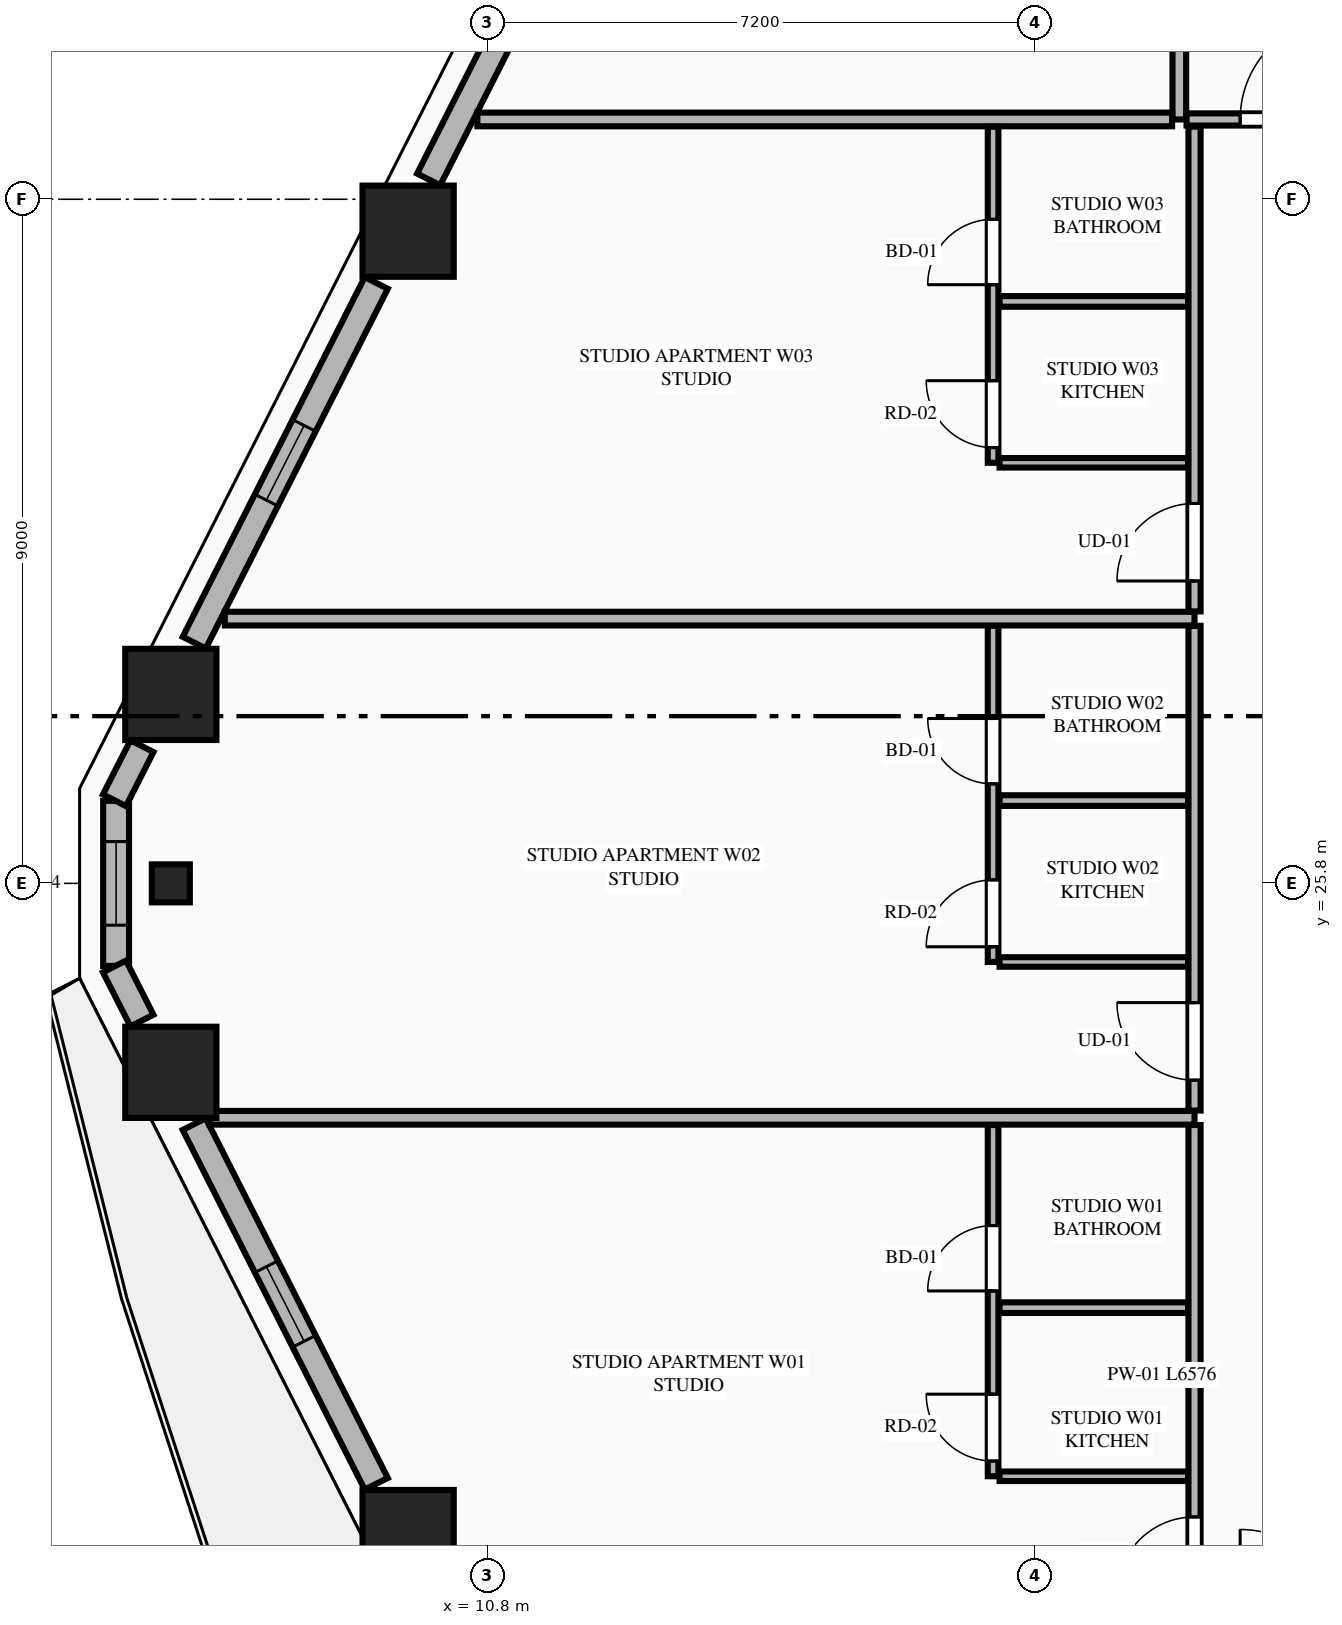
"""IFC4 building model, lengths in metres.
Left out: names, types, materials, properties, quantities, classifications, styles, units other than length and angle.
Written with IfcOpenShell. Run it as: python <this file> out.ifc"""

import sys

from ifc_helpers import new_model, si_unit, direction, frame, frame_2d, origin, origin_2d, place, context, subcontext, project, spatial, rectangle, extrude, element, fill, save


model = new_model("IFC4")
c1 = context("Model", 3, precision=1e-05, world=origin(), true_north=direction((0.0, 1.0)))
c2 = subcontext(c1, "Body", "Model", "MODEL_VIEW")
j1 = project(units=[si_unit("LENGTHUNIT", "METRE"), si_unit("PLANEANGLEUNIT", "RADIAN")], contexts=[c1])
p1 = place(None, origin())
s1 = spatial("IfcSite", under=j1, at=p1, CompositionType="ELEMENT")
p2 = place(p1, origin())
s2 = spatial("IfcBuilding", under=s1, at=p2, CompositionType="ELEMENT")
p3 = place(p2, frame((0.0, 0.0, 67.5)))
s3 = spatial("IfcBuildingStorey", under=s2, at=p3, CompositionType="ELEMENT", Elevation=67.5)
for number, where, z_axis, x_axis in (
    (1, (9.754, 34.38, 0.0), (0.0, 0.0, 1.0), (1.0, 0.0, 0.0)),
    (2, (6.632, 28.286, 0.0), (0.0, 0.0, 1.0), (1.0, 0.0, 0.0)),
    (3, (6.632, 23.314, 0.0), (0.0, 0.0, 1.0), (1.0, 0.0, 0.0)),
    (4, (9.754, 17.22, 0.0), (0.0, 0.0, 1.0), (1.0, 0.0, 0.0)),
):
    element("IfcColumn", number, at=place(p3, frame(where, z_axis=z_axis, x_axis=x_axis)), inside=s3, PredefinedType="COLUMN", context=c2, shape_type="SweptSolid", body=[
        extrude(rectangle(XDim=1.2, YDim=1.2, at=origin_2d()), origin(), (0.0, 0.0, 1.0), 3.55),
    ])
p4 = place(p3, frame((6.632, 25.8, 0.0), z_axis=(0.0, 0.0, 1.0), x_axis=(0.0, -1.0, 0.0)))
e5 = element("IfcColumn", 5, at=p4, inside=s3, PredefinedType="PILASTER", context=c2, shape_type="SweptSolid", body=[
    extrude(rectangle(XDim=0.5, YDim=0.35, at=origin_2d()), origin(), (0.0, 0.0, 1.0), 3.55),
])
p5 = place(p3, frame((5.912, 26.886, 0.0), z_axis=(0.0, 0.0, 1.0), x_axis=(0.0, -1.0, 0.0)))
e6 = element("IfcWall", 6, at=p5, inside=s3, PredefinedType="STANDARD", context=c2, shape_type="SweptSolid", body=[
    extrude(rectangle(XDim=2.172, YDim=0.34, at=frame_2d((1.086, 0.0))), origin(), (0.0, 0.0, 1.0), 3.33),
])
p6 = place(p5, frame((0.536, 0.0, 0.75)))
e7 = element("IfcOpeningElement", 7, at=p6, cuts=e6, PredefinedType="OPENING", context=c2, shape_type="SweptSolid", body=[
    extrude(rectangle(XDim=1.1, YDim=2.0, at=frame_2d((0.55, 1.0))), frame((0.0, 0.18, 0.0), z_axis=(0.0, -1.0, 0.0), x_axis=(1.0, 0.0, 0.0)), (0.0, 0.0, 1.0), 0.36),
])
p7 = place(p3, frame((12.529, 40.01, 0.0), z_axis=(0.0, 0.0, 1.0), x_axis=(-0.451627137896, -0.892206774417, 0.0)))
e8 = element("IfcWall", 8, at=p7, inside=s3, PredefinedType="STANDARD", context=c2, shape_type="SweptSolid", body=[
    extrude(rectangle(XDim=5.547, YDim=0.34, at=frame_2d((2.773, 0.0))), origin(), (0.0, 0.0, 1.0), 2.787),
])
p8 = place(p7, frame((2.223, 0.0, 0.75)))
e9 = element("IfcOpeningElement", 9, at=p8, cuts=e8, PredefinedType="OPENING", context=c2, shape_type="SweptSolid", body=[
    extrude(rectangle(XDim=1.1, YDim=1.887, at=frame_2d((0.55, 0.943))), frame((0.0, 0.18, 0.0), z_axis=(0.0, -1.0, 0.0), x_axis=(1.0, 0.0, 0.0)), (0.0, 0.0, 1.0), 0.36),
])
p9 = place(p3, frame((9.335, 33.699, 0.0), z_axis=(0.0, 0.0, 1.0), x_axis=(-0.451590635984, -0.892225250422, 0.0)))
e10 = element("IfcWall", 10, at=p9, inside=s3, PredefinedType="STANDARD", context=c2, shape_type="SweptSolid", body=[
    extrude(rectangle(XDim=5.303, YDim=0.34, at=frame_2d((2.652, 0.0))), origin(), (0.0, 0.0, 1.0), 2.787),
])
p10 = place(p9, frame((2.102, 0.0, 0.75)))
e11 = element("IfcOpeningElement", 11, at=p10, cuts=e10, PredefinedType="OPENING", context=c2, shape_type="SweptSolid", body=[
    extrude(rectangle(XDim=1.1, YDim=1.887, at=frame_2d((0.55, 0.943))), frame((0.0, 0.18, 0.0), z_axis=(0.0, -1.0, 0.0), x_axis=(1.0, 0.0, 0.0)), (0.0, 0.0, 1.0), 0.36),
])
for number, where, z_axis, x_axis in (
    (12, (6.252, 27.605, 0.0), (0.0, 0.0, 1.0), (-0.452, -0.892, 0.0)),
    (13, (5.891, 24.707, 0.0), (0.0, 0.0, 1.0), (0.452, -0.892, 0.0)),
):
    element("IfcWall", number, at=place(p3, frame(where, z_axis=z_axis, x_axis=x_axis)), inside=s3, PredefinedType="STANDARD", context=c2, shape_type="SweptSolid", body=[
        extrude(rectangle(XDim=0.798, YDim=0.34, at=frame_2d((0.399, 0.0))), origin(), (0.0, 0.0, 1.0), 3.33),
    ])
p11 = place(p3, frame((6.94, 22.633, 0.0), z_axis=(0.0, 0.0, 1.0), x_axis=(0.451572088722, -0.892234637686, 0.0)))
e14 = element("IfcWall", 14, at=p11, inside=s3, PredefinedType="STANDARD", context=c2, shape_type="SweptSolid", body=[
    extrude(rectangle(XDim=5.304, YDim=0.34, at=frame_2d((2.652, 0.0))), origin(), (0.0, 0.0, 1.0), 2.787),
])
p12 = place(p11, frame((2.102, 0.0, 0.75)))
e15 = element("IfcOpeningElement", 15, at=p12, cuts=e14, PredefinedType="OPENING", context=c2, shape_type="SweptSolid", body=[
    extrude(rectangle(XDim=1.1, YDim=1.887, at=frame_2d((0.55, 0.943))), frame((0.0, 0.18, 0.0), z_axis=(0.0, -1.0, 0.0), x_axis=(1.0, 0.0, 0.0)), (0.0, 0.0, 1.0), 0.36),
])
p13 = place(p3, frame((19.9, 35.85, 0.0), z_axis=(0.0, 0.0, 1.0), x_axis=(0.0, 1.0, 0.0)))
e16 = element("IfcWall", 16, at=p13, inside=s3, PredefinedType="PARTITIONING", context=c2, shape_type="SweptSolid", body=[
    extrude(rectangle(XDim=13.295, YDim=0.18, at=frame_2d((6.647, 0.0))), origin(), (0.0, 0.0, 1.0), 3.33),
])
p14 = place(p3, frame((19.995, 35.85, 0.0), z_axis=(0.0, 0.0, 1.0), x_axis=(1.0, 0.0, 0.0)))
e17 = element("IfcWall", 17, at=p14, inside=s3, PredefinedType="PARTITIONING", context=c2, shape_type="SweptSolid", body=[
    extrude(rectangle(XDim=16.432, YDim=0.16, at=frame_2d((8.216, 0.0))), origin(), (0.0, 0.0, 1.0), 3.33),
])
p15 = place(p14, frame((0.705, 0.0, 0.0)))
e18 = element("IfcOpeningElement", 18, at=p15, cuts=e17, PredefinedType="OPENING", context=c2, shape_type="SweptSolid", body=[
    extrude(rectangle(XDim=1.35, YDim=2.35, at=frame_2d((0.675, 1.175))), frame((0.0, 0.09, 0.0), z_axis=(0.0, -1.0, 0.0), x_axis=(1.0, 0.0, 0.0)), (0.0, 0.0, 1.0), 0.18),
])
p16 = place(p3, frame((10.665, 35.85, 0.0), z_axis=(0.0, 0.0, 1.0), x_axis=(1.0, 0.0, 0.0)))
e19 = element("IfcWall", 19, at=p16, inside=s3, PredefinedType="PARTITIONING", context=c2, shape_type="SweptSolid", body=[
    extrude(rectangle(XDim=9.14, YDim=0.18, at=frame_2d((4.57, 0.0))), origin(), (0.0, 0.0, 1.0), 3.33),
])
p17 = place(p3, frame((20.1, 16.045, 0.0), z_axis=(0.0, 0.0, 1.0), x_axis=(0.0, 1.0, 0.0)))
e20 = element("IfcWall", 20, at=p17, inside=s3, PredefinedType="PARTITIONING", context=c2, shape_type="SweptSolid", body=[
    extrude(rectangle(XDim=6.576, YDim=0.16, at=frame_2d((3.288, 0.0))), origin(), (0.0, 0.0, 1.0), 3.33),
])
p18 = place(p17, frame((0.4, 0.0, 0.0)))
e21 = element("IfcOpeningElement", 21, at=p18, cuts=e20, PredefinedType="OPENING", context=c2, shape_type="SweptSolid", body=[
    extrude(rectangle(XDim=1.02, YDim=2.25, at=frame_2d((0.51, 1.125))), frame((0.0, 0.09, 0.0), z_axis=(0.0, -1.0, 0.0), x_axis=(1.0, 0.0, 0.0)), (0.0, 0.0, 1.0), 0.18),
])
p19 = place(p3, frame((17.535, 18.0, 0.0), z_axis=(0.0, 0.0, 1.0), x_axis=(1.0, 0.0, 0.0)))
e22 = element("IfcWall", 22, at=p19, inside=s3, PredefinedType="PARTITIONING", context=c2, shape_type="SweptSolid", body=[
    extrude(rectangle(XDim=2.48, YDim=0.125, at=frame_2d((1.24, 0.0))), origin(), (0.0, 0.0, 1.0), 2.636),
])
p20 = place(p3, frame((17.45, 18.0, 0.0), z_axis=(0.0, 0.0, 1.0), x_axis=(0.0, 1.0, 0.0)))
e23 = element("IfcWall", 23, at=p20, inside=s3, PredefinedType="PLUMBINGWALL", context=c2, shape_type="SweptSolid", body=[
    extrude(rectangle(XDim=4.621, YDim=0.14, at=frame_2d((2.311, 0.0))), origin(), (0.0, 0.0, 1.0), 3.33),
])
p21 = place(p20, frame((2.438, 0.0, 0.0)))
e24 = element("IfcOpeningElement", 24, at=p21, cuts=e23, PredefinedType="OPENING", context=c2, shape_type="SweptSolid", body=[
    extrude(rectangle(XDim=0.86, YDim=2.1, at=frame_2d((0.43, 1.05))), frame((0.0, 0.08, 0.0), z_axis=(0.0, -1.0, 0.0), x_axis=(1.0, 0.0, 0.0)), (0.0, 0.0, 1.0), 0.16),
])
p22 = place(p20, frame((0.2, 0.0, 0.0)))
e25 = element("IfcOpeningElement", 25, at=p22, cuts=e23, PredefinedType="OPENING", context=c2, shape_type="SweptSolid", body=[
    extrude(rectangle(XDim=0.88, YDim=2.15, at=frame_2d((0.44, 1.075))), frame((0.0, 0.08, 0.0), z_axis=(0.0, -1.0, 0.0), x_axis=(1.0, 0.0, 0.0)), (0.0, 0.0, 1.0), 0.16),
])
p23 = place(p3, frame((17.535, 20.218, 0.0), z_axis=(0.0, 0.0, 1.0), x_axis=(1.0, 0.0, 0.0)))
e26 = element("IfcWall", 26, at=p23, inside=s3, PredefinedType="PLUMBINGWALL", context=c2, shape_type="SweptSolid", body=[
    extrude(rectangle(XDim=2.48, YDim=0.14, at=frame_2d((1.24, 0.0))), origin(), (0.0, 0.0, 1.0), 3.33),
])
p24 = place(p3, frame((7.14, 22.716, 0.0), z_axis=(0.0, 0.0, 1.0), x_axis=(1.0, 0.0, 0.0)))
e27 = element("IfcWall", 27, at=p24, inside=s3, PredefinedType="PARTITIONING", context=c2, shape_type="SweptSolid", body=[
    extrude(rectangle(XDim=12.96, YDim=0.18, at=frame_2d((6.48, 0.0))), origin(), (0.0, 0.0, 1.0), 3.33),
])
p25 = place(p3, frame((20.1, 22.811, 0.0), z_axis=(0.0, 0.0, 1.0), x_axis=(0.0, 1.0, 0.0)))
e28 = element("IfcWall", 28, at=p25, inside=s3, PredefinedType="PARTITIONING", context=c2, shape_type="SweptSolid", body=[
    extrude(rectangle(XDim=6.377, YDim=0.16, at=frame_2d((3.188, 0.0))), origin(), (0.0, 0.0, 1.0), 3.33),
])
p26 = place(p25, frame((0.4, 0.0, 0.0)))
e29 = element("IfcOpeningElement", 29, at=p26, cuts=e28, PredefinedType="OPENING", context=c2, shape_type="SweptSolid", body=[
    extrude(rectangle(XDim=1.02, YDim=2.25, at=frame_2d((0.51, 1.125))), frame((0.0, 0.09, 0.0), z_axis=(0.0, -1.0, 0.0), x_axis=(1.0, 0.0, 0.0)), (0.0, 0.0, 1.0), 0.18),
])
p27 = place(p3, frame((17.535, 24.766, 0.0), z_axis=(0.0, 0.0, 1.0), x_axis=(1.0, 0.0, 0.0)))
e30 = element("IfcWall", 30, at=p27, inside=s3, PredefinedType="PARTITIONING", context=c2, shape_type="SweptSolid", body=[
    extrude(rectangle(XDim=2.48, YDim=0.125, at=frame_2d((1.24, 0.0))), origin(), (0.0, 0.0, 1.0), 3.33),
])
p28 = place(p3, frame((17.45, 24.766, 0.0), z_axis=(0.0, 0.0, 1.0), x_axis=(0.0, 1.0, 0.0)))
e31 = element("IfcWall", 31, at=p28, inside=s3, PredefinedType="PLUMBINGWALL", context=c2, shape_type="SweptSolid", body=[
    extrude(rectangle(XDim=4.422, YDim=0.14, at=frame_2d((2.211, 0.0))), origin(), (0.0, 0.0, 1.0), 3.33),
])
p29 = place(p28, frame((2.343, 0.0, 0.0)))
e32 = element("IfcOpeningElement", 32, at=p29, cuts=e31, PredefinedType="OPENING", context=c2, shape_type="SweptSolid", body=[
    extrude(rectangle(XDim=0.86, YDim=2.1, at=frame_2d((0.43, 1.05))), frame((0.0, 0.08, 0.0), z_axis=(0.0, -1.0, 0.0), x_axis=(1.0, 0.0, 0.0)), (0.0, 0.0, 1.0), 0.16),
])
p30 = place(p28, frame((0.2, 0.0, 0.0)))
e33 = element("IfcOpeningElement", 33, at=p30, cuts=e31, PredefinedType="OPENING", context=c2, shape_type="SweptSolid", body=[
    extrude(rectangle(XDim=0.88, YDim=2.15, at=frame_2d((0.44, 1.075))), frame((0.0, 0.08, 0.0), z_axis=(0.0, -1.0, 0.0), x_axis=(1.0, 0.0, 0.0)), (0.0, 0.0, 1.0), 0.16),
])
p31 = place(p3, frame((17.535, 26.889, 0.0), z_axis=(0.0, 0.0, 1.0), x_axis=(1.0, 0.0, 0.0)))
e34 = element("IfcWall", 34, at=p31, inside=s3, PredefinedType="PLUMBINGWALL", context=c2, shape_type="SweptSolid", body=[
    extrude(rectangle(XDim=2.48, YDim=0.14, at=frame_2d((1.24, 0.0))), origin(), (0.0, 0.0, 1.0), 3.33),
])
p32 = place(p3, frame((7.342, 29.283, 0.0), z_axis=(0.0, 0.0, 1.0), x_axis=(1.0, 0.0, 0.0)))
e35 = element("IfcWall", 35, at=p32, inside=s3, PredefinedType="PARTITIONING", context=c2, shape_type="SweptSolid", body=[
    extrude(rectangle(XDim=12.758, YDim=0.18, at=frame_2d((6.379, 0.0))), origin(), (0.0, 0.0, 1.0), 3.33),
])
p33 = place(p3, frame((20.1, 29.378, 0.0), z_axis=(0.0, 0.0, 1.0), x_axis=(0.0, 1.0, 0.0)))
e36 = element("IfcWall", 36, at=p33, inside=s3, PredefinedType="PARTITIONING", context=c2, shape_type="SweptSolid", body=[
    extrude(rectangle(XDim=6.377, YDim=0.16, at=frame_2d((3.188, 0.0))), origin(), (0.0, 0.0, 1.0), 3.33),
])
p34 = place(p33, frame((0.4, 0.0, 0.0)))
e37 = element("IfcOpeningElement", 37, at=p34, cuts=e36, PredefinedType="OPENING", context=c2, shape_type="SweptSolid", body=[
    extrude(rectangle(XDim=1.02, YDim=2.25, at=frame_2d((0.51, 1.125))), frame((0.0, 0.09, 0.0), z_axis=(0.0, -1.0, 0.0), x_axis=(1.0, 0.0, 0.0)), (0.0, 0.0, 1.0), 0.18),
])
p35 = place(p3, frame((17.535, 31.333, 0.0), z_axis=(0.0, 0.0, 1.0), x_axis=(1.0, 0.0, 0.0)))
e38 = element("IfcWall", 38, at=p35, inside=s3, PredefinedType="PARTITIONING", context=c2, shape_type="SweptSolid", body=[
    extrude(rectangle(XDim=2.48, YDim=0.125, at=frame_2d((1.24, 0.0))), origin(), (0.0, 0.0, 1.0), 3.33),
])
p36 = place(p3, frame((17.45, 31.333, 0.0), z_axis=(0.0, 0.0, 1.0), x_axis=(0.0, 1.0, 0.0)))
e39 = element("IfcWall", 39, at=p36, inside=s3, PredefinedType="PLUMBINGWALL", context=c2, shape_type="SweptSolid", body=[
    extrude(rectangle(XDim=4.422, YDim=0.14, at=frame_2d((2.211, 0.0))), origin(), (0.0, 0.0, 1.0), 3.33),
])
p37 = place(p36, frame((2.343, 0.0, 0.0)))
e40 = element("IfcOpeningElement", 40, at=p37, cuts=e39, PredefinedType="OPENING", context=c2, shape_type="SweptSolid", body=[
    extrude(rectangle(XDim=0.86, YDim=2.1, at=frame_2d((0.43, 1.05))), frame((0.0, 0.08, 0.0), z_axis=(0.0, -1.0, 0.0), x_axis=(1.0, 0.0, 0.0)), (0.0, 0.0, 1.0), 0.16),
])
p38 = place(p36, frame((0.2, 0.0, 0.0)))
e41 = element("IfcOpeningElement", 41, at=p38, cuts=e39, PredefinedType="OPENING", context=c2, shape_type="SweptSolid", body=[
    extrude(rectangle(XDim=0.88, YDim=2.15, at=frame_2d((0.44, 1.075))), frame((0.0, 0.08, 0.0), z_axis=(0.0, -1.0, 0.0), x_axis=(1.0, 0.0, 0.0)), (0.0, 0.0, 1.0), 0.16),
])
p39 = place(p3, frame((17.535, 33.456, 0.0), z_axis=(0.0, 0.0, 1.0), x_axis=(1.0, 0.0, 0.0)))
e42 = element("IfcWall", 42, at=p39, inside=s3, PredefinedType="PLUMBINGWALL", context=c2, shape_type="SweptSolid", body=[
    extrude(rectangle(XDim=2.48, YDim=0.14, at=frame_2d((1.24, 0.0))), origin(), (0.0, 0.0, 1.0), 2.636),
])
p40 = place(p10, origin())
e43 = element("IfcWindow", 43, at=p40, inside=s3, PartitioningType="SINGLE_PANEL", PredefinedType="WINDOW", context=c2, shape_type="SweptSolid", body=[
    extrude(rectangle(XDim=1.1, YDim=1.887, at=frame_2d((0.55, 0.943))), frame((0.0, 0.03, 0.0), z_axis=(0.0, -1.0, 0.0), x_axis=(1.0, 0.0, 0.0)), (0.0, 0.0, 1.0), 0.06),
])
fill(e11, e43)
p41 = place(p12, origin())
e44 = element("IfcWindow", 44, at=p41, inside=s3, PartitioningType="SINGLE_PANEL", PredefinedType="WINDOW", context=c2, shape_type="SweptSolid", body=[
    extrude(rectangle(XDim=1.1, YDim=1.887, at=frame_2d((0.55, 0.943))), frame((0.0, 0.03, 0.0), z_axis=(0.0, -1.0, 0.0), x_axis=(1.0, 0.0, 0.0)), (0.0, 0.0, 1.0), 0.06),
])
fill(e15, e44)
p42 = place(p15, origin())
e45 = element("IfcDoor", 45, at=p42, inside=s3, OperationType="SINGLE_SWING_RIGHT", PredefinedType="DOOR", context=c2, shape_type="SweptSolid", body=[
    extrude(rectangle(XDim=1.35, YDim=2.35, at=frame_2d((0.675, 1.175))), frame((0.0, 0.025, 0.0), z_axis=(0.0, -1.0, 0.0), x_axis=(1.0, 0.0, 0.0)), (0.0, 0.0, 1.0), 0.05),
])
fill(e18, e45)
p43 = place(p21, origin())
e46 = element("IfcDoor", 46, at=p43, inside=s3, OperationType="SINGLE_SWING_LEFT", PredefinedType="DOOR", context=c2, shape_type="SweptSolid", body=[
    extrude(rectangle(XDim=0.86, YDim=2.1, at=frame_2d((0.43, 1.05))), frame((0.0, 0.025, 0.0), z_axis=(0.0, -1.0, 0.0), x_axis=(1.0, 0.0, 0.0)), (0.0, 0.0, 1.0), 0.05),
])
fill(e24, e46)
p44 = place(p18, origin())
e47 = element("IfcDoor", 47, at=p44, inside=s3, OperationType="SINGLE_SWING_LEFT", PredefinedType="DOOR", context=c2, shape_type="SweptSolid", body=[
    extrude(rectangle(XDim=1.02, YDim=2.25, at=frame_2d((0.51, 1.125))), frame((0.0, 0.025, 0.0), z_axis=(0.0, -1.0, 0.0), x_axis=(1.0, 0.0, 0.0)), (0.0, 0.0, 1.0), 0.05),
])
fill(e21, e47)
p45 = place(p22, origin())
e48 = element("IfcDoor", 48, at=p45, inside=s3, OperationType="SINGLE_SWING_RIGHT", PredefinedType="DOOR", context=c2, shape_type="SweptSolid", body=[
    extrude(rectangle(XDim=0.88, YDim=2.15, at=frame_2d((0.44, 1.075))), frame((0.0, 0.025, 0.0), z_axis=(0.0, -1.0, 0.0), x_axis=(1.0, 0.0, 0.0)), (0.0, 0.0, 1.0), 0.05),
])
fill(e25, e48)
p46 = place(p29, origin())
e49 = element("IfcDoor", 49, at=p46, inside=s3, OperationType="SINGLE_SWING_RIGHT", PredefinedType="DOOR", context=c2, shape_type="SweptSolid", body=[
    extrude(rectangle(XDim=0.86, YDim=2.1, at=frame_2d((0.43, 1.05))), frame((0.0, 0.025, 0.0), z_axis=(0.0, -1.0, 0.0), x_axis=(1.0, 0.0, 0.0)), (0.0, 0.0, 1.0), 0.05),
])
fill(e32, e49)
p47 = place(p26, origin())
e50 = element("IfcDoor", 50, at=p47, inside=s3, OperationType="SINGLE_SWING_RIGHT", PredefinedType="DOOR", context=c2, shape_type="SweptSolid", body=[
    extrude(rectangle(XDim=1.02, YDim=2.25, at=frame_2d((0.51, 1.125))), frame((0.0, 0.025, 0.0), z_axis=(0.0, -1.0, 0.0), x_axis=(1.0, 0.0, 0.0)), (0.0, 0.0, 1.0), 0.05),
])
fill(e29, e50)
p48 = place(p30, origin())
e51 = element("IfcDoor", 51, at=p48, inside=s3, OperationType="SINGLE_SWING_LEFT", PredefinedType="DOOR", context=c2, shape_type="SweptSolid", body=[
    extrude(rectangle(XDim=0.88, YDim=2.15, at=frame_2d((0.44, 1.075))), frame((0.0, 0.025, 0.0), z_axis=(0.0, -1.0, 0.0), x_axis=(1.0, 0.0, 0.0)), (0.0, 0.0, 1.0), 0.05),
])
fill(e33, e51)
p49 = place(p37, origin())
e52 = element("IfcDoor", 52, at=p49, inside=s3, OperationType="SINGLE_SWING_LEFT", PredefinedType="DOOR", context=c2, shape_type="SweptSolid", body=[
    extrude(rectangle(XDim=0.86, YDim=2.1, at=frame_2d((0.43, 1.05))), frame((0.0, 0.025, 0.0), z_axis=(0.0, -1.0, 0.0), x_axis=(1.0, 0.0, 0.0)), (0.0, 0.0, 1.0), 0.05),
])
fill(e40, e52)
p50 = place(p34, origin())
e53 = element("IfcDoor", 53, at=p50, inside=s3, OperationType="SINGLE_SWING_LEFT", PredefinedType="DOOR", context=c2, shape_type="SweptSolid", body=[
    extrude(rectangle(XDim=1.02, YDim=2.25, at=frame_2d((0.51, 1.125))), frame((0.0, 0.025, 0.0), z_axis=(0.0, -1.0, 0.0), x_axis=(1.0, 0.0, 0.0)), (0.0, 0.0, 1.0), 0.05),
])
fill(e37, e53)
p51 = place(p38, origin())
e54 = element("IfcDoor", 54, at=p51, inside=s3, OperationType="SINGLE_SWING_RIGHT", PredefinedType="DOOR", context=c2, shape_type="SweptSolid", body=[
    extrude(rectangle(XDim=0.88, YDim=2.15, at=frame_2d((0.44, 1.075))), frame((0.0, 0.025, 0.0), z_axis=(0.0, -1.0, 0.0), x_axis=(1.0, 0.0, 0.0)), (0.0, 0.0, 1.0), 0.05),
])
fill(e41, e54)
p52 = place(p6, origin())
e55 = element("IfcWindow", 55, at=p52, inside=s3, PartitioningType="SINGLE_PANEL", PredefinedType="WINDOW", context=c2, shape_type="SweptSolid", body=[
    extrude(rectangle(XDim=1.1, YDim=2.0, at=frame_2d((0.55, 1.0))), frame((0.0, 0.03, 0.0), z_axis=(0.0, -1.0, 0.0), x_axis=(1.0, 0.0, 0.0)), (0.0, 0.0, 1.0), 0.06),
])
fill(e7, e55)
save(model, sys.argv[1])
